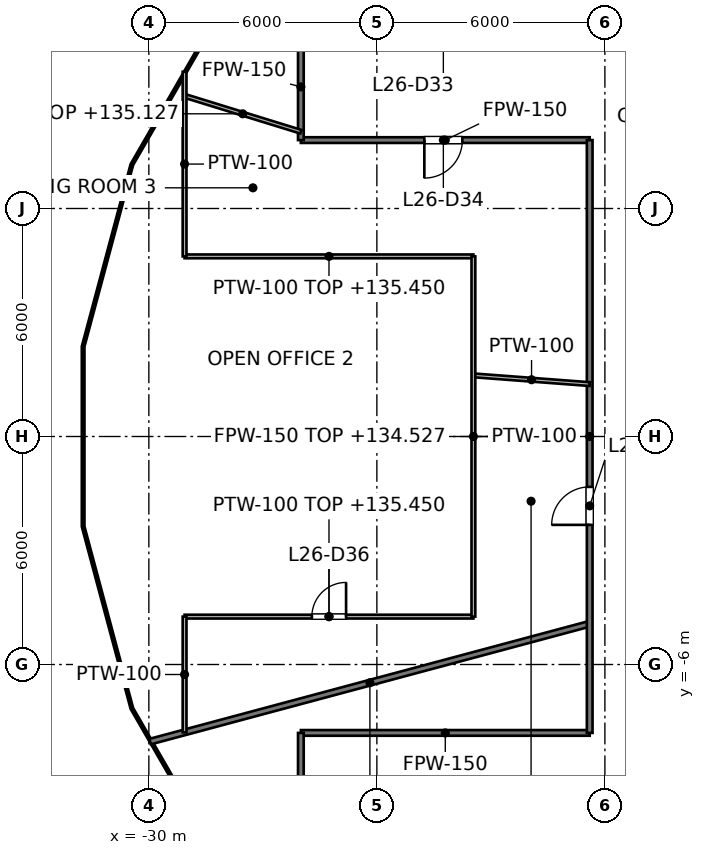
"""IFC4 building model, lengths in metres.
Left out: names, types, materials, properties, quantities, classifications, styles, units other than length and angle.
Written with IfcOpenShell. Run it as: python <this file> out.ifc"""

import sys

from ifc_helpers import new_model, si_unit, direction, frame, frame_2d, origin, place, context, subcontext, project, spatial, rectangle, extrude, element, fill, save


model = new_model("IFC4")
c1 = context("Model", 3, precision=1e-05, world=origin(), true_north=direction((0.0, 1.0)))
c2 = subcontext(c1, "Body", "Model", "MODEL_VIEW")
j1 = project(units=[si_unit("LENGTHUNIT", "METRE"), si_unit("PLANEANGLEUNIT", "RADIAN")], contexts=[c1])
p1 = place(None, origin())
s1 = spatial("IfcSite", under=j1, at=p1, CompositionType="ELEMENT")
p2 = place(p1, origin())
s2 = spatial("IfcBuilding", under=s1, at=p2, CompositionType="ELEMENT")
p3 = place(p2, frame((0.0, 0.0, 131.4)))
s3 = spatial("IfcBuildingStorey", under=s2, at=p3, CompositionType="ELEMENT", Elevation=131.4)
p4 = place(p3, frame((-26.0, -7.8, 0.0), z_axis=(0.0, 0.0, 1.0), x_axis=(1.0, 0.0, 0.0)))
e1 = element("IfcWall", 1, at=p4, inside=s3, PredefinedType="PARTITIONING", context=c2, shape_type="SweptSolid", body=[
    extrude(rectangle(XDim=7.6, YDim=0.15, at=frame_2d((3.8, 0.0))), origin(), (0.0, 0.0, 1.0), 3.276),
])
p5 = place(p3, frame((-26.0, 7.8, 0.0), z_axis=(0.0, 0.0, 1.0), x_axis=(1.0, 0.0, 0.0)))
e2 = element("IfcWall", 2, at=p5, inside=s3, PredefinedType="PARTITIONING", context=c2, shape_type="SweptSolid", body=[
    extrude(rectangle(XDim=7.6, YDim=0.15, at=frame_2d((3.8, 0.0))), origin(), (0.0, 0.0, 1.0), 3.276),
])
p6 = place(p5, frame((3.249, 0.0, 0.0)))
e3 = element("IfcOpeningElement", 3, at=p6, cuts=e2, PredefinedType="OPENING", context=c2, shape_type="SweptSolid", body=[
    extrude(rectangle(XDim=1.0, YDim=2.1, at=frame_2d((0.5, 1.05))), frame((0.0, 0.075, 0.0), z_axis=(0.0, -1.0, 0.0), x_axis=(1.0, 0.0, 0.0)), (0.0, 0.0, 1.0), 0.15),
])
p7 = place(p3, frame((-29.966, -8.029, 0.0), z_axis=(0.0, 0.0, 1.0), x_axis=(0.965898076595, 0.258922586171, 0.0)))
e4 = element("IfcWall", 4, at=p7, inside=s3, PredefinedType="PARTITIONING", context=c2, shape_type="SweptSolid", body=[
    extrude(rectangle(XDim=11.974, YDim=0.15, at=frame_2d((5.987, 0.0))), origin(), (0.0, 0.0, 1.0), 3.727),
])
p8 = place(p3, frame((-18.4, -7.8, 0.0), z_axis=(0.0, 0.0, 1.0), x_axis=(0.0, 1.0, 0.0)))
e5 = element("IfcWall", 5, at=p8, inside=s3, PredefinedType="PARTITIONING", context=c2, shape_type="SweptSolid", body=[
    extrude(rectangle(XDim=15.6, YDim=0.15, at=frame_2d((7.8, 0.0))), origin(), (0.0, 0.0, 1.0), 3.127),
])
p9 = place(p8, frame((5.474, 0.0, 0.0)))
e6 = element("IfcOpeningElement", 6, at=p9, cuts=e5, PredefinedType="OPENING", context=c2, shape_type="SweptSolid", body=[
    extrude(rectangle(XDim=1.0, YDim=2.1, at=frame_2d((0.5, 1.05))), frame((0.0, 0.075, 0.0), z_axis=(0.0, -1.0, 0.0), x_axis=(1.0, 0.0, 0.0)), (0.0, 0.0, 1.0), 0.15),
])
for number, where, z_axis, x_axis in (
    (7, (-26.0, -10.6, 0.0), (0.0, 0.0, 1.0), (0.0, 1.0, 0.0)),
    (8, (-26.0, 7.8, 0.0), (0.0, 0.0, 1.0), (0.0, 1.0, 0.0)),
):
    element("IfcWall", number, at=place(p3, frame(where, z_axis=z_axis, x_axis=x_axis)), inside=s3, PredefinedType="PARTITIONING", context=c2, shape_type="SweptSolid", body=[
        extrude(rectangle(XDim=2.8, YDim=0.15, at=frame_2d((1.4, 0.0))), origin(), (0.0, 0.0, 1.0), 3.276),
    ])
p10 = place(p3, frame((-29.06, 8.964, 0.0), z_axis=(0.0, 0.0, 1.0), x_axis=(0.955556205091, -0.294808987162, 0.0)))
e9 = element("IfcWall", 9, at=p10, inside=s3, PredefinedType="PARTITIONING", context=c2, shape_type="SweptSolid", body=[
    extrude(rectangle(XDim=3.202, YDim=0.1, at=frame_2d((1.601, 0.0))), origin(), (0.0, 0.0, 1.0), 3.727),
])
p11 = place(p3, frame((-21.46, 1.609, 0.0), z_axis=(0.0, 0.0, 1.0), x_axis=(0.99718772759, -0.074944218876, 0.0)))
e10 = element("IfcWall", 10, at=p11, inside=s3, PredefinedType="PARTITIONING", context=c2, shape_type="SweptSolid", body=[
    extrude(rectangle(XDim=3.069, YDim=0.1, at=frame_2d((1.534, 0.0))), origin(), (0.0, 0.0, 1.0), 3.127),
])
p12 = place(p3, frame((-29.06, -4.74, 0.0), z_axis=(0.0, 0.0, 1.0), x_axis=(1.0, 0.0, 0.0)))
e11 = element("IfcWall", 11, at=p12, inside=s3, PredefinedType="PARTITIONING", context=c2, shape_type="SweptSolid", body=[
    extrude(rectangle(XDim=7.6, YDim=0.1, at=frame_2d((3.8, 0.0))), origin(), (0.0, 0.0, 1.0), 4.05),
])
p13 = place(p12, frame((3.35, 0.0, 0.0)))
e12 = element("IfcOpeningElement", 12, at=p13, cuts=e11, PredefinedType="OPENING", context=c2, shape_type="SweptSolid", body=[
    extrude(rectangle(XDim=0.9, YDim=2.1, at=frame_2d((0.45, 1.05))), frame((0.0, 0.05, 0.0), z_axis=(0.0, -1.0, 0.0), x_axis=(1.0, 0.0, 0.0)), (0.0, 0.0, 1.0), 0.1),
])
p14 = place(p3, frame((-29.06, 4.74, 0.0), z_axis=(0.0, 0.0, 1.0), x_axis=(1.0, 0.0, 0.0)))
e13 = element("IfcWall", 13, at=p14, inside=s3, PredefinedType="PARTITIONING", context=c2, shape_type="SweptSolid", body=[
    extrude(rectangle(XDim=7.6, YDim=0.1, at=frame_2d((3.8, 0.0))), origin(), (0.0, 0.0, 1.0), 4.05),
])
p15 = place(p3, frame((-21.46, -4.74, 0.0), z_axis=(0.0, 0.0, 1.0), x_axis=(0.0, 1.0, 0.0)))
e14 = element("IfcWall", 14, at=p15, inside=s3, PredefinedType="PARTITIONING", context=c2, shape_type="SweptSolid", body=[
    extrude(rectangle(XDim=9.48, YDim=0.1, at=frame_2d((4.74, 0.0))), origin(), (0.0, 0.0, 1.0), 3.127),
])
p16 = place(p3, frame((-29.06, -7.786, 0.0), z_axis=(0.0, 0.0, 1.0), x_axis=(0.0, 1.0, 0.0)))
e15 = element("IfcWall", 15, at=p16, inside=s3, PredefinedType="PARTITIONING", context=c2, shape_type="SweptSolid", body=[
    extrude(rectangle(XDim=3.046, YDim=0.1, at=frame_2d((1.523, 0.0))), origin(), (0.0, 0.0, 1.0), 3.127),
])
p17 = place(p3, frame((-29.06, 4.74, 0.0), z_axis=(0.0, 0.0, 1.0), x_axis=(0.0, 1.0, 0.0)))
e16 = element("IfcWall", 16, at=p17, inside=s3, PredefinedType="PARTITIONING", context=c2, shape_type="SweptSolid", body=[
    extrude(rectangle(XDim=4.858, YDim=0.1, at=frame_2d((2.429, 0.0))), origin(), (0.0, 0.0, 1.0), 3.127),
])
p18 = place(p6, origin())
e17 = element("IfcDoor", 17, at=p18, inside=s3, OperationType="SINGLE_SWING_LEFT", PredefinedType="DOOR", context=c2, shape_type="SweptSolid", body=[
    extrude(rectangle(XDim=1.0, YDim=2.1, at=frame_2d((0.5, 1.05))), frame((0.0, 0.025, 0.0), z_axis=(0.0, -1.0, 0.0), x_axis=(1.0, 0.0, 0.0)), (0.0, 0.0, 1.0), 0.05),
])
fill(e3, e17)
p19 = place(p9, origin())
e18 = element("IfcDoor", 18, at=p19, inside=s3, OperationType="SINGLE_SWING_LEFT", PredefinedType="DOOR", context=c2, shape_type="SweptSolid", body=[
    extrude(rectangle(XDim=1.0, YDim=2.1, at=frame_2d((0.5, 1.05))), frame((0.0, 0.025, 0.0), z_axis=(0.0, -1.0, 0.0), x_axis=(1.0, 0.0, 0.0)), (0.0, 0.0, 1.0), 0.05),
])
fill(e6, e18)
p20 = place(p13, origin())
e19 = element("IfcDoor", 19, at=p20, inside=s3, OperationType="SINGLE_SWING_RIGHT", PredefinedType="DOOR", context=c2, shape_type="SweptSolid", body=[
    extrude(rectangle(XDim=0.9, YDim=2.1, at=frame_2d((0.45, 1.05))), frame((0.0, 0.025, 0.0), z_axis=(0.0, -1.0, 0.0), x_axis=(1.0, 0.0, 0.0)), (0.0, 0.0, 1.0), 0.05),
])
fill(e12, e19)
save(model, sys.argv[1])
